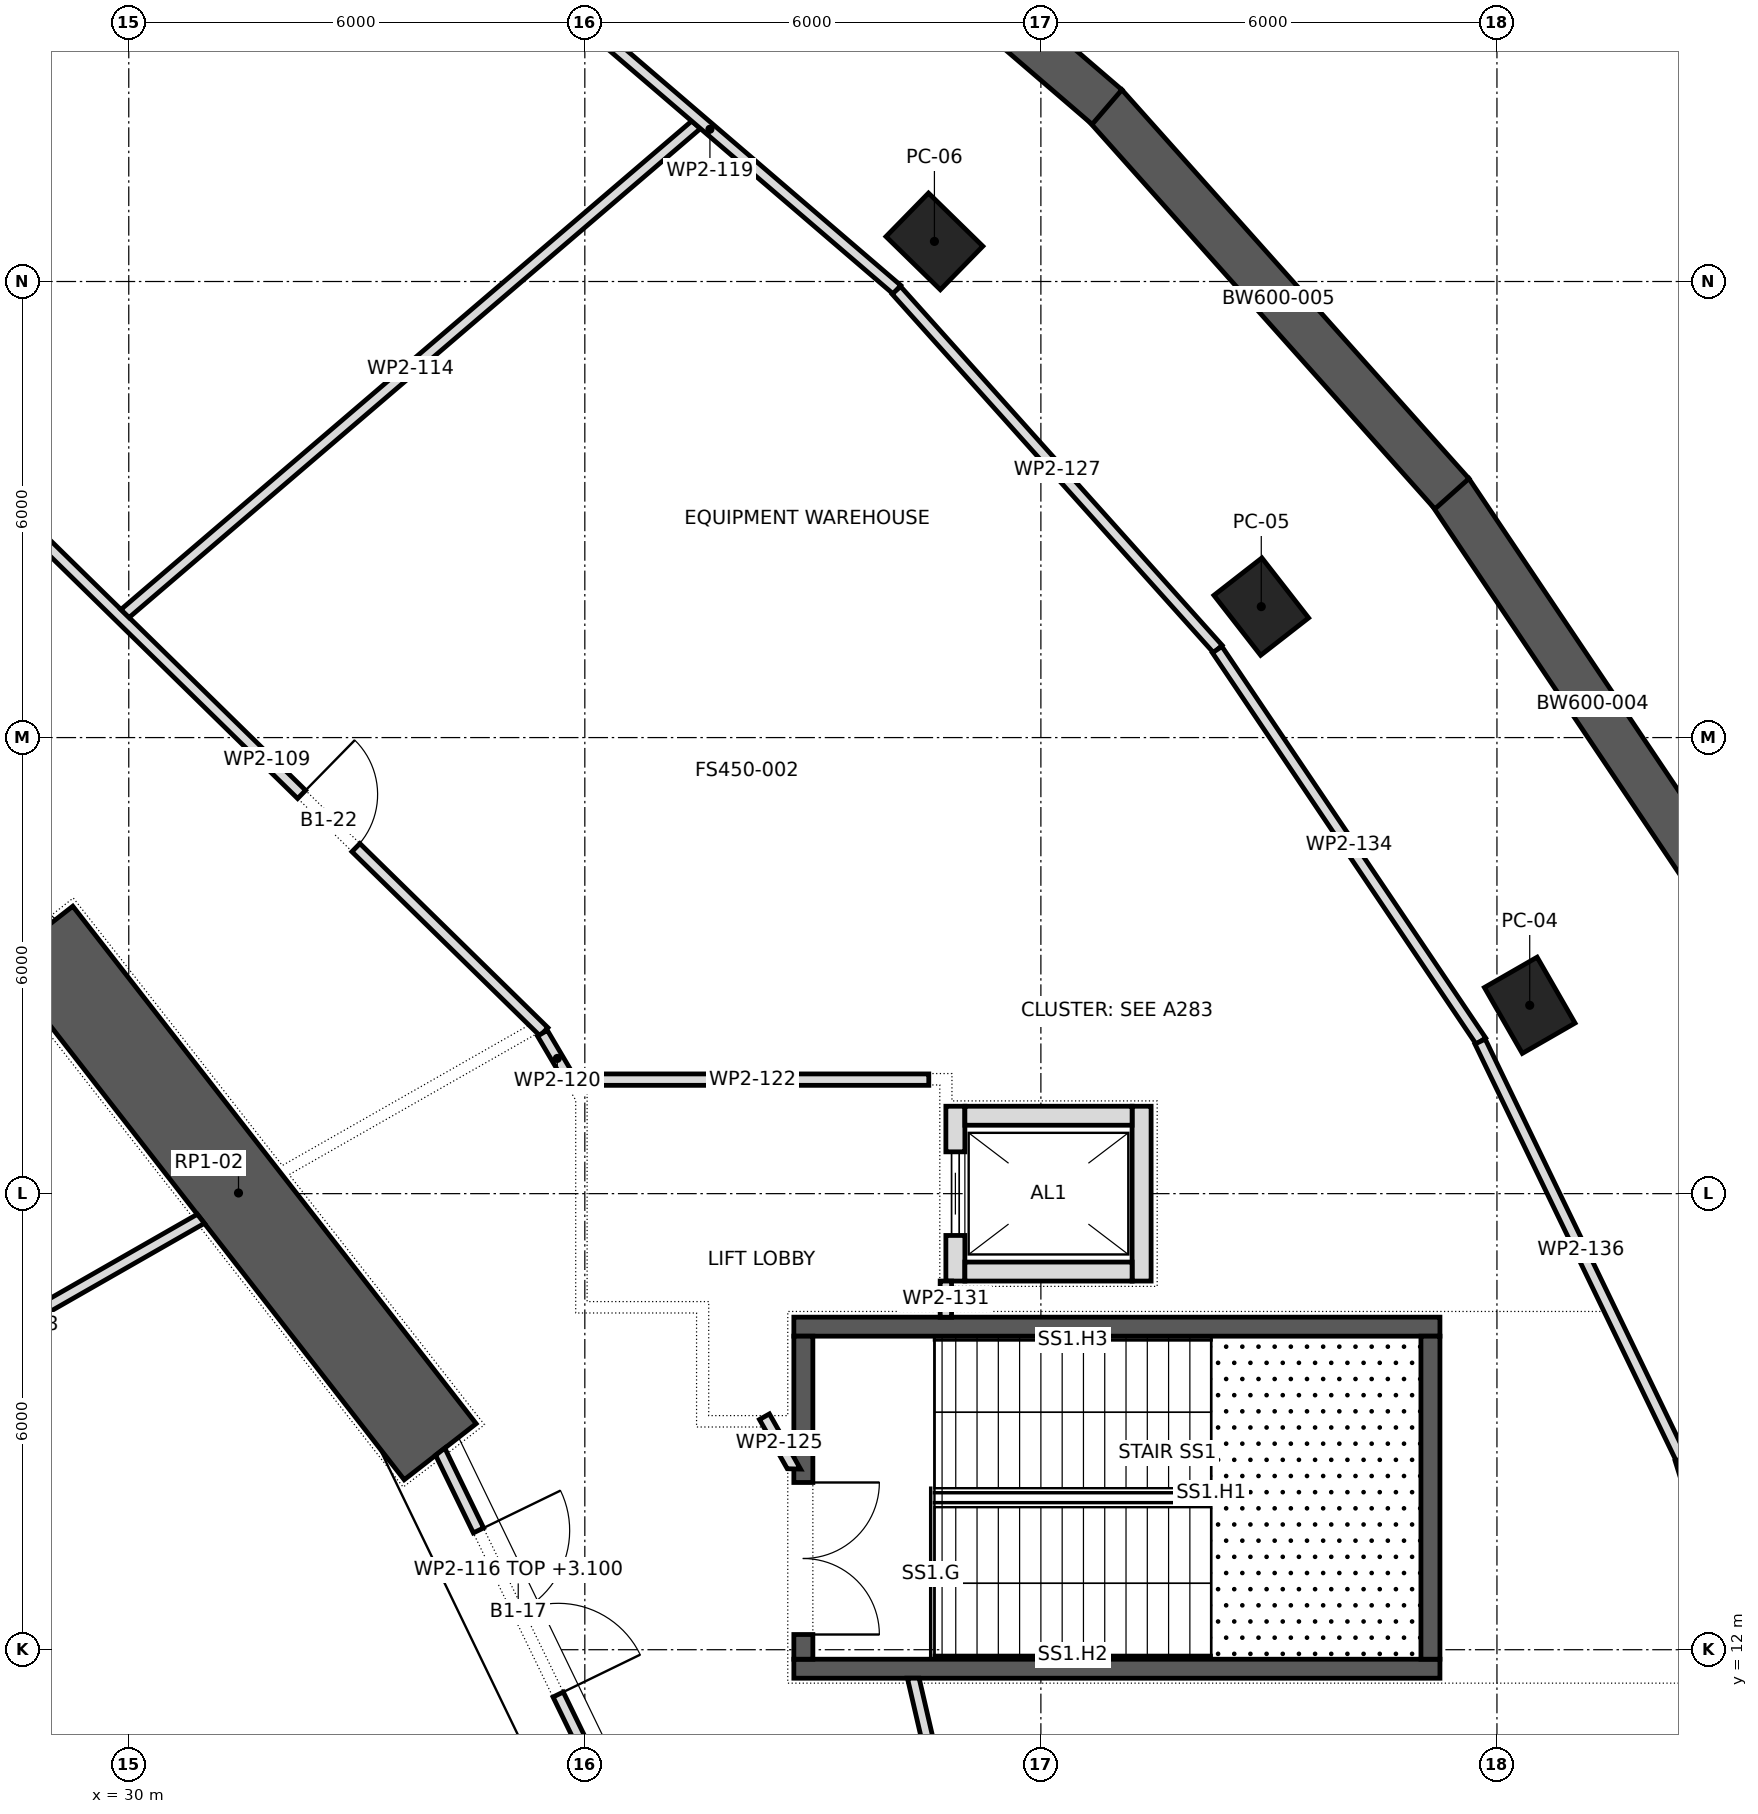
"""IFC4 building model, lengths in metres.
Left out: names, types, materials, properties, quantities, classifications, styles, units other than length and angle.
Written with IfcOpenShell. Run it as: python <this file> out.ifc"""

import sys

from ifc_helpers import new_model, si_unit, direction, frame, frame_2d, origin, origin_2d, place, context, subcontext, project, spatial, polyline, rectangle, outline, extrude, element, fill, save


model = new_model("IFC4")
c1 = context("Model", 3, precision=1e-05, world=origin(), true_north=direction((0.0, 1.0)))
c2 = subcontext(c1, "Body", "Model", "MODEL_VIEW")
j1 = project(units=[si_unit("LENGTHUNIT", "METRE"), si_unit("PLANEANGLEUNIT", "RADIAN")], contexts=[c1])
p1 = place(None, origin())
s1 = spatial("IfcSite", under=j1, at=p1, CompositionType="ELEMENT")
p2 = place(p1, origin())
s2 = spatial("IfcBuilding", under=s1, at=p2, CompositionType="ELEMENT")
p3 = place(p2, frame((0.0, 0.0, -4.0)))
s3 = spatial("IfcBuildingStorey", under=s2, at=p3, CompositionType="ELEMENT", Elevation=-4.0)
for number, where, z_axis, x_axis in (
    (1, (48.431, 20.478, 0.0), (0.0, 0.0, 1.0), (-0.499, 0.867, 0.0)),
    (2, (44.899, 25.723, 0.0), (0.0, 0.0, 1.0), (-0.615, 0.789, 0.0)),
    (3, (40.599, 30.528, 0.0), (0.0, 0.0, 1.0), (-0.715, 0.699, 0.0)),
):
    element("IfcColumn", number, at=place(p3, frame(where, z_axis=z_axis, x_axis=x_axis)), inside=s3, PredefinedType="COLUMN", context=c2, shape_type="SweptSolid", body=[
        extrude(rectangle(XDim=1.0, YDim=0.8, at=origin_2d()), origin(), (0.0, 0.0, 1.0), 4.0),
    ])
p4 = place(p3, frame((34.097, 14.605, 0.0), z_axis=(0.0, 0.0, 1.0), x_axis=(-0.614825322247, 0.788663314174, 0.0)))
e4 = element("IfcWall", 4, at=p4, inside=s3, PredefinedType="SHEAR", context=c2, shape_type="SweptSolid", body=[
    extrude(rectangle(XDim=8.632, YDim=1.2, at=frame_2d((4.316, 0.0))), origin(), (0.0, 0.0, 1.0), 4.0),
])
p5 = place(p3, frame((51.134, 21.654, 0.0), z_axis=(0.0, 0.0, 1.0), x_axis=(-0.557518861869, 0.830164272093, 0.0)))
e5 = element("IfcWall", 5, at=p5, inside=s3, PredefinedType="SOLIDWALL", context=c2, shape_type="SweptSolid", body=[
    extrude(rectangle(XDim=6.729, YDim=0.6, at=frame_2d((3.364, 0.0))), origin(), (0.0, 0.0, 1.0), 4.0),
])
p6 = place(p3, frame((47.407, 27.208, 0.0), z_axis=(0.0, 0.0, 1.0), x_axis=(-0.665894053378, 0.74604631872, 0.0)))
e6 = element("IfcWall", 6, at=p6, inside=s3, PredefinedType="SOLIDWALL", context=c2, shape_type="SweptSolid", body=[
    extrude(rectangle(XDim=6.856, YDim=0.6, at=frame_2d((3.428, 0.0))), origin(), (0.0, 0.0, 1.0), 4.0),
])
p7 = place(p3, frame((42.87, 32.295, 0.0), z_axis=(0.0, 0.0, 1.0), x_axis=(-0.758319142722, 0.65188348482, 0.0)))
e7 = element("IfcWall", 7, at=p7, inside=s3, PredefinedType="SOLIDWALL", context=c2, shape_type="SweptSolid", body=[
    extrude(rectangle(XDim=6.991, YDim=0.6, at=frame_2d((3.496, 0.0))), origin(), (0.0, 0.0, 1.0), 4.0),
])
for number, where, z_axis, x_axis in (
    (8, (38.75, 16.25, 0.0), (0.0, 0.0, 1.0), (1.0, 0.0, 0.0)),
    (9, (38.75, 11.75, 0.0), (0.0, 0.0, 1.0), (1.0, 0.0, 0.0)),
):
    element("IfcWall", number, at=place(p3, frame(where, z_axis=z_axis, x_axis=x_axis)), inside=s3, PredefinedType="SHEAR", context=c2, shape_type="SweptSolid", body=[
        extrude(rectangle(XDim=8.5, YDim=0.25, at=frame_2d((4.25, 0.0))), origin(), (0.0, 0.0, 1.0), 3.55),
    ])
p8 = place(p3, frame((38.875, 11.875, 0.0), z_axis=(0.0, 0.0, 1.0), x_axis=(0.0, 1.0, 0.0)))
e10 = element("IfcWall", 10, at=p8, inside=s3, PredefinedType="SHEAR", context=c2, shape_type="SweptSolid", body=[
    extrude(rectangle(XDim=4.25, YDim=0.25, at=frame_2d((2.125, 0.0))), origin(), (0.0, 0.0, 1.0), 3.55),
])
p9 = place(p8, frame((0.325, 0.0, 0.0)))
e11 = element("IfcOpeningElement", 11, at=p9, cuts=e10, PredefinedType="OPENING", context=c2, shape_type="SweptSolid", body=[
    extrude(rectangle(XDim=2.0, YDim=2.1, at=frame_2d((1.0, 1.05))), frame((0.0, 0.137, 0.0), z_axis=(0.0, -1.0, 0.0), x_axis=(1.0, 0.0, 0.0)), (0.0, 0.0, 1.0), 0.274),
])
p10 = place(p3, frame((47.125, 11.875, 0.0), z_axis=(0.0, 0.0, 1.0), x_axis=(0.0, 1.0, 0.0)))
e12 = element("IfcWall", 12, at=p10, inside=s3, PredefinedType="SHEAR", context=c2, shape_type="SweptSolid", body=[
    extrude(rectangle(XDim=4.25, YDim=0.25, at=frame_2d((2.125, 0.0))), origin(), (0.0, 0.0, 1.0), 3.55),
])
p11 = place(p3, frame((40.875, 16.85, 0.0), z_axis=(0.0, 0.0, 1.0), x_axis=(0.0, 1.0, 0.0)))
e13 = element("IfcWall", 13, at=p11, inside=s3, PredefinedType="PARTITIONING", context=c2, shape_type="SweptSolid", body=[
    extrude(rectangle(XDim=2.3, YDim=0.25, at=frame_2d((1.15, 0.0))), origin(), (0.0, 0.0, 1.0), 3.55),
])
p12 = place(p11, frame((0.6, 0.0, 0.0)))
e14 = element("IfcOpeningElement", 14, at=p12, cuts=e13, PredefinedType="OPENING", context=c2, shape_type="SweptSolid", body=[
    extrude(rectangle(XDim=1.1, YDim=2.1, at=frame_2d((0.55, 1.05))), frame((0.0, 0.137, 0.0), z_axis=(0.0, -1.0, 0.0), x_axis=(1.0, 0.0, 0.0)), (0.0, 0.0, 1.0), 0.274),
])
p13 = place(p3, frame((43.325, 16.85, 0.0), z_axis=(0.0, 0.0, 1.0), x_axis=(0.0, 1.0, 0.0)))
e15 = element("IfcWall", 15, at=p13, inside=s3, PredefinedType="PARTITIONING", context=c2, shape_type="SweptSolid", body=[
    extrude(rectangle(XDim=2.3, YDim=0.25, at=frame_2d((1.15, 0.0))), origin(), (0.0, 0.0, 1.0), 3.55),
])
for number, where, z_axis, x_axis in (
    (16, (41.0, 19.025, 0.0), (0.0, 0.0, 1.0), (1.0, 0.0, 0.0)),
    (17, (41.0, 16.975, 0.0), (0.0, 0.0, 1.0), (1.0, 0.0, 0.0)),
):
    element("IfcWall", number, at=place(p3, frame(where, z_axis=z_axis, x_axis=x_axis)), inside=s3, PredefinedType="PARTITIONING", context=c2, shape_type="SweptSolid", body=[
        extrude(rectangle(XDim=2.2, YDim=0.25, at=frame_2d((1.1, 0.0))), origin(), (0.0, 0.0, 1.0), 3.55),
    ])
p14 = place(p3, frame((26.074, 14.882, 0.0), z_axis=(0.0, 0.0, 1.0), x_axis=(0.868133416031, 0.496330909746, 0.0)))
e18 = element("IfcWall", 18, at=p14, inside=s3, PredefinedType="PARTITIONING", context=c2, shape_type="SweptSolid", body=[
    extrude(outline(polyline([(0.0, -0.075), (5.626, -0.075), (5.604, 0.075), (0.0, 0.075), (0.0, -0.075)])), origin(), (0.0, 0.0, 1.0), 3.55),
])
p15 = place(p3, frame((28.174, 27.268, 0.0), z_axis=(0.0, 0.0, 1.0), x_axis=(0.714427427428, -0.699709547554, 0.0)))
e19 = element("IfcWall", 19, at=p15, inside=s3, PredefinedType="PARTITIONING", context=c2, shape_type="SweptSolid", body=[
    extrude(rectangle(XDim=10.202, YDim=0.15, at=frame_2d((5.101, 0.0))), origin(), (0.0, 0.0, 1.0), 3.55),
])
p16 = place(p15, frame((5.74, 0.0, 0.0)))
e20 = element("IfcOpeningElement", 20, at=p16, cuts=e19, PredefinedType="OPENING", context=c2, shape_type="SweptSolid", body=[
    extrude(rectangle(XDim=1.0, YDim=2.1, at=frame_2d((0.5, 1.05))), frame((0.0, 0.087, 0.0), z_axis=(0.0, -1.0, 0.0), x_axis=(1.0, 0.0, 0.0)), (0.0, 0.0, 1.0), 0.174),
])
p17 = place(p3, frame((29.95, 25.632, 0.0), z_axis=(0.0, 0.0, 1.0), x_axis=(0.759739094859, 0.650228042876, 0.0)))
e21 = element("IfcWall", 21, at=p17, inside=s3, PredefinedType="PARTITIONING", context=c2, shape_type="SweptSolid", body=[
    extrude(outline(polyline([(0.007, -0.075), (9.901, -0.075), (9.878, 0.075), (-0.007, 0.075), (0.007, -0.075)])), origin(), (0.0, 0.0, 1.0), 3.55),
])
p18 = place(p3, frame((34.097, 14.606, 0.0), z_axis=(0.0, 0.0, 1.0), x_axis=(0.436936398764, -0.899492403212, 0.0)))
e22 = element("IfcWall", 22, at=p18, inside=s3, PredefinedType="PARTITIONING", context=c2, shape_type="SweptSolid", body=[
    extrude(outline(polyline([(0.016, -0.075), (4.681, -0.075), (4.715, 0.075), (-0.016, 0.075), (0.016, -0.075)])), origin(), (0.0, 0.0, 1.0), 3.1),
])
p19 = place(p18, frame((1.152, 0.0, 0.0)))
e23 = element("IfcOpeningElement", 23, at=p19, cuts=e22, PredefinedType="OPENING", context=c2, shape_type="SweptSolid", body=[
    extrude(rectangle(XDim=2.4, YDim=2.1, at=frame_2d((1.2, 1.05))), frame((0.0, 0.087, 0.0), z_axis=(0.0, -1.0, 0.0), x_axis=(1.0, 0.0, 0.0)), (0.0, 0.0, 1.0), 0.174),
])
p20 = place(p3, frame((35.185, 34.114, 0.0), z_axis=(0.0, 0.0, 1.0), x_axis=(0.759033312601, -0.651051787773, 0.0)))
e24 = element("IfcWall", 24, at=p20, inside=s3, PredefinedType="PARTITIONING", context=c2, shape_type="SweptSolid", body=[
    extrude(rectangle(XDim=6.484, YDim=0.15, at=frame_2d((3.242, 0.0))), origin(), (0.0, 0.0, 1.0), 3.55),
])
p21 = place(p3, frame((35.443, 20.111, 0.0), z_axis=(0.0, 0.0, 1.0), x_axis=(0.507767925719, -0.861493896444, 0.0)))
e25 = element("IfcWall", 25, at=p21, inside=s3, PredefinedType="PARTITIONING", context=c2, shape_type="SweptSolid", body=[
    extrude(rectangle(XDim=0.77, YDim=0.15, at=frame_2d((0.385, 0.0))), origin(), (0.0, 0.0, 1.0), 3.55),
])
p22 = place(p3, frame((35.889, 19.5, 0.0), z_axis=(0.0, 0.0, 1.0), x_axis=(1.0, 0.0, 0.0)))
e26 = element("IfcWall", 26, at=p22, inside=s3, PredefinedType="PARTITIONING", context=c2, shape_type="SweptSolid", body=[
    extrude(outline(polyline([(0.045, -0.075), (4.636, -0.075), (4.636, 0.075), (-0.045, 0.075), (0.045, -0.075)])), origin(), (0.0, 0.0, 1.0), 3.55),
])
p23 = place(p3, frame((38.363, 15.065, 0.0), z_axis=(0.0, 0.0, 1.0), x_axis=(0.49173071, -0.870747327784, 0.0)))
e27 = element("IfcWall", 27, at=p23, inside=s3, PredefinedType="PARTITIONING", context=c2, shape_type="SweptSolid", body=[
    extrude(outline(polyline([(0.0, -0.075), (0.743, -0.075), (0.833, 0.075), (0.0, 0.075), (0.0, -0.075)])), origin(), (0.0, 0.0, 1.0), 3.55),
])
p24 = place(p3, frame((40.099, 29.885, 0.0), z_axis=(0.0, 0.0, 1.0), x_axis=(0.6673947824, -0.744704105283, 0.0)))
e28 = element("IfcWall", 28, at=p24, inside=s3, PredefinedType="PARTITIONING", context=c2, shape_type="SweptSolid", body=[
    extrude(rectangle(XDim=6.338, YDim=0.15, at=frame_2d((3.169, 0.0))), origin(), (0.0, 0.0, 1.0), 3.55),
])
p25 = place(p3, frame((40.321, 11.625, 0.0), z_axis=(0.0, 0.0, 1.0), x_axis=(0.226176729561, -0.974086283142, 0.0)))
e29 = element("IfcWall", 29, at=p25, inside=s3, PredefinedType="PARTITIONING", context=c2, shape_type="SweptSolid", body=[
    extrude(outline(polyline([(-0.017, -0.075), (9.501, -0.075), (9.501, 0.075), (0.017, 0.075), (-0.017, -0.075)])), origin(), (0.0, 0.0, 1.0), 3.55),
])
p26 = place(p25, frame((4.249, 0.0, 0.0)))
e30 = element("IfcOpeningElement", 30, at=p26, cuts=e29, PredefinedType="OPENING", context=c2, shape_type="SweptSolid", body=[
    extrude(rectangle(XDim=1.0, YDim=2.1, at=frame_2d((0.5, 1.05))), frame((0.0, 0.087, 0.0), z_axis=(0.0, -1.0, 0.0), x_axis=(1.0, 0.0, 0.0)), (0.0, 0.0, 1.0), 0.174),
])
p27 = place(p3, frame((40.75, 16.85, 0.0), z_axis=(0.0, 0.0, 1.0), x_axis=(0.0, -1.0, 0.0)))
e31 = element("IfcWall", 31, at=p27, inside=s3, PredefinedType="PARTITIONING", context=c2, shape_type="SweptSolid", body=[
    extrude(rectangle(XDim=0.476, YDim=0.15, at=frame_2d((0.238, 0.0))), origin(), (0.0, 0.0, 1.0), 3.55),
])
p28 = place(p3, frame((44.319, 25.157, 0.0), z_axis=(0.0, 0.0, 1.0), x_axis=(0.558812320082, -0.829294152231, 0.0)))
e32 = element("IfcWall", 32, at=p28, inside=s3, PredefinedType="PARTITIONING", context=c2, shape_type="SweptSolid", body=[
    extrude(rectangle(XDim=6.21, YDim=0.15, at=frame_2d((3.105, 0.0))), origin(), (0.0, 0.0, 1.0), 3.55),
])
p29 = place(p3, frame((47.778, 20.001, 0.0), z_axis=(0.0, 0.0, 1.0), x_axis=(0.434690826011, -0.900579749818, 0.0)))
e33 = element("IfcWall", 33, at=p29, inside=s3, PredefinedType="PARTITIONING", context=c2, shape_type="SweptSolid", body=[
    extrude(rectangle(XDim=6.096, YDim=0.15, at=frame_2d((3.048, 0.0))), origin(), (0.0, 0.0, 1.0), 3.55),
])
p30 = place(p3, frame((50.416, 14.506, 0.0), z_axis=(0.0, 0.0, 1.0), x_axis=(0.297713123711, -0.954655380737, 0.0)))
e34 = element("IfcWall", 34, at=p30, inside=s3, PredefinedType="PARTITIONING", context=c2, shape_type="SweptSolid", body=[
    extrude(rectangle(XDim=6.013, YDim=0.15, at=frame_2d((3.006, 0.0))), origin(), (0.0, 0.0, 1.0), 3.55),
])
p31 = place(p12, origin())
e35 = element("IfcDoor", 35, at=p31, inside=s3, OperationType="SLIDING_TO_LEFT", PredefinedType="DOOR", context=c2, shape_type="SweptSolid", body=[
    extrude(rectangle(XDim=1.1, YDim=2.1, at=frame_2d((0.55, 1.05))), frame((0.0, 0.025, 0.0), z_axis=(0.0, -1.0, 0.0), x_axis=(1.0, 0.0, 0.0)), (0.0, 0.0, 1.0), 0.05),
])
fill(e14, e35)
p32 = place(p9, frame((2.0, 0.0, 0.0), z_axis=(0.0, 0.0, 1.0), x_axis=(-1.0, 0.0, 0.0)))
e36 = element("IfcDoor", 36, at=p32, inside=s3, OperationType="DOUBLE_DOOR_SINGLE_SWING", PredefinedType="DOOR", context=c2, shape_type="SweptSolid", body=[
    extrude(rectangle(XDim=2.0, YDim=2.1, at=frame_2d((1.0, 1.05))), frame((0.0, 0.025, 0.0), z_axis=(0.0, -1.0, 0.0), x_axis=(1.0, 0.0, 0.0)), (0.0, 0.0, 1.0), 0.05),
])
fill(e11, e36)
p33 = place(p19, origin())
e37 = element("IfcDoor", 37, at=p33, inside=s3, OperationType="DOUBLE_DOOR_SINGLE_SWING", PredefinedType="DOOR", context=c2, shape_type="SweptSolid", body=[
    extrude(rectangle(XDim=2.4, YDim=2.1, at=frame_2d((1.2, 1.05))), frame((0.0, 0.025, 0.0), z_axis=(0.0, -1.0, 0.0), x_axis=(1.0, 0.0, 0.0)), (0.0, 0.0, 1.0), 0.05),
])
fill(e23, e37)
p34 = place(p16, origin())
e38 = element("IfcDoor", 38, at=p34, inside=s3, OperationType="SINGLE_SWING_RIGHT", PredefinedType="DOOR", context=c2, shape_type="SweptSolid", body=[
    extrude(rectangle(XDim=1.0, YDim=2.1, at=frame_2d((0.5, 1.05))), frame((0.0, 0.025, 0.0), z_axis=(0.0, -1.0, 0.0), x_axis=(1.0, 0.0, 0.0)), (0.0, 0.0, 1.0), 0.05),
])
fill(e20, e38)
save(model, sys.argv[1])
